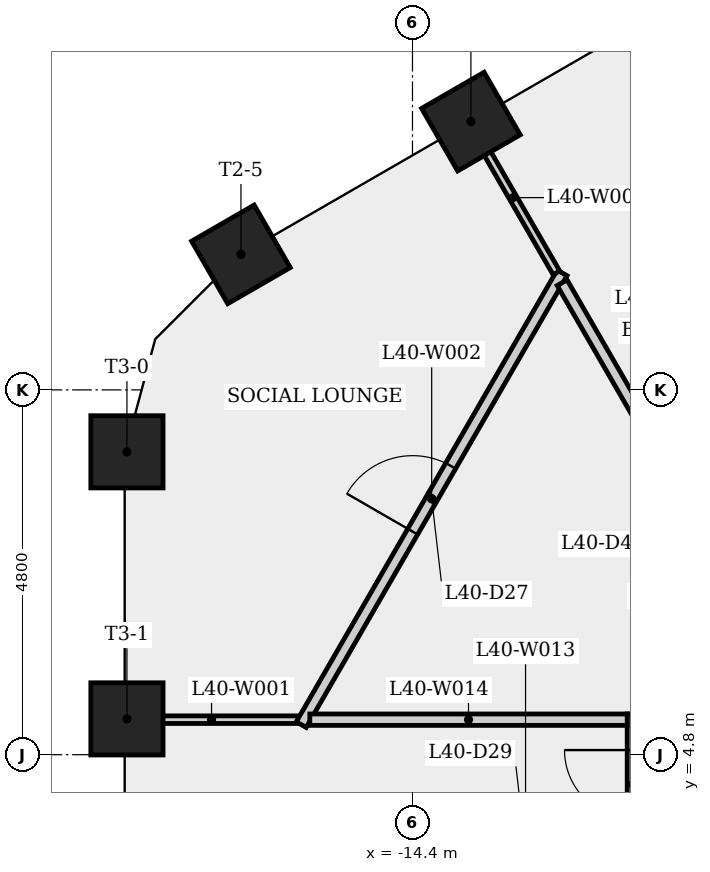
"""IFC4 building model, lengths in metres.
Left out: names, types, materials, properties, quantities, classifications, styles, units other than length and angle.
Written with IfcOpenShell. Run it as: python <this file> out.ifc"""

import sys

from ifc_helpers import new_model, si_unit, direction, frame, frame_2d, origin, origin_2d, place, context, subcontext, project, spatial, rectangle, extrude, element, fill, save


model = new_model("IFC4")
c1 = context("Model", 3, precision=1e-05, world=origin(), true_north=direction((0.0, 1.0)))
c2 = subcontext(c1, "Body", "Model", "MODEL_VIEW")
j1 = project(units=[si_unit("LENGTHUNIT", "METRE"), si_unit("PLANEANGLEUNIT", "RADIAN")], contexts=[c1])
p1 = place(None, origin())
s1 = spatial("IfcSite", under=j1, at=p1, CompositionType="ELEMENT")
p2 = place(p1, origin())
s2 = spatial("IfcBuilding", under=s1, at=p2, CompositionType="ELEMENT")
p3 = place(p2, frame((0.0, 0.0, 152.7)))
s3 = spatial("IfcBuildingStorey", under=s2, at=p3, CompositionType="ELEMENT", Elevation=152.7)
for number, where, z_axis, x_axis in (
    (1, (-13.631, 13.13, 0.0), (0.0, 0.0, 1.0), (-0.5, 0.866, 0.0)),
    (2, (-16.657, 11.383, 0.0), (0.0, 0.0, 1.0), (-0.5, 0.866, 0.0)),
    (3, (-18.157, 8.785, 0.0), (0.0, 0.0, 1.0), (-1.0, 0.0, 0.0)),
    (4, (-18.157, 5.271, 0.0), (0.0, 0.0, 1.0), (-1.0, 0.0, 0.0)),
):
    element("IfcColumn", number, at=place(p3, frame(where, z_axis=z_axis, x_axis=x_axis)), inside=s3, PredefinedType="COLUMN", context=c2, shape_type="SweptSolid", body=[
        extrude(rectangle(XDim=0.95, YDim=0.95, at=origin_2d()), origin(), (0.0, 0.0, 1.0), 3.4),
    ])
p4 = place(p3, frame((-15.901, 5.261, 0.0), z_axis=(0.0, 0.0, 1.0), x_axis=(-1.0, 0.0, 0.0)))
e5 = element("IfcWall", 5, at=p4, inside=s3, PredefinedType="PARTITIONING", context=c2, shape_type="SweptSolid", body=[
    extrude(rectangle(XDim=2.286, YDim=0.1, at=frame_2d((1.143, 0.0))), origin(), (0.0, 0.0, 1.0), 3.05),
])
p5 = place(p3, frame((-15.863, 5.196, 0.0), z_axis=(0.0, 0.0, 1.0), x_axis=(0.499991347294, 0.866030399369, 0.0)))
e6 = element("IfcWall", 6, at=p5, inside=s3, PredefinedType="PARTITIONING", context=c2, shape_type="SweptSolid", body=[
    extrude(rectangle(XDim=6.864, YDim=0.15, at=frame_2d((3.432, 0.0))), origin(), (0.0, 0.0, 1.0), 3.05),
])
p6 = place(p5, frame((2.932, 0.0, 0.0)))
e7 = element("IfcOpeningElement", 7, at=p6, cuts=e6, PredefinedType="OPENING", context=c2, shape_type="SweptSolid", body=[
    extrude(rectangle(XDim=1.0, YDim=2.1, at=frame_2d((0.5, 1.05))), frame((0.0, 0.085, 0.0), z_axis=(0.0, -1.0, 0.0), x_axis=(1.0, 0.0, 0.0)), (0.0, 0.0, 1.0), 0.17),
])
p7 = place(p3, frame((-13.649, 13.12, 0.0), z_axis=(0.0, 0.0, 1.0), x_axis=(0.499987504325, -0.866032618045, 0.0)))
e8 = element("IfcWall", 8, at=p7, inside=s3, PredefinedType="PARTITIONING", context=c2, shape_type="SweptSolid", body=[
    extrude(rectangle(XDim=2.286, YDim=0.1, at=frame_2d((1.143, 0.0))), origin(), (0.0, 0.0, 1.0), 3.05),
])
p8 = place(p3, frame((-12.431, 11.01, 0.0), z_axis=(0.0, 0.0, 1.0), x_axis=(0.500001430823, -0.866024577697, 0.0)))
e9 = element("IfcWall", 9, at=p8, inside=s3, PredefinedType="PARTITIONING", context=c2, shape_type="SweptSolid", body=[
    extrude(rectangle(XDim=5.126, YDim=0.15, at=frame_2d((2.563, 0.0))), origin(), (0.0, 0.0, 1.0), 3.05),
])
p9 = place(p8, frame((2.075, 0.0, 0.0)))
e10 = element("IfcOpeningElement", 10, at=p9, cuts=e9, PredefinedType="OPENING", context=c2, shape_type="SweptSolid", body=[
    extrude(rectangle(XDim=0.9, YDim=2.1, at=frame_2d((0.45, 1.05))), frame((0.0, 0.085, 0.0), z_axis=(0.0, -1.0, 0.0), x_axis=(1.0, 0.0, 0.0)), (0.0, 0.0, 1.0), 0.17),
])
p10 = place(p3, frame((-11.5, -5.186, 0.0), z_axis=(0.0, 0.0, 1.0), x_axis=(0.0, 1.0, 0.0)))
e11 = element("IfcWall", 11, at=p10, inside=s3, PredefinedType="PARTITIONING", context=c2, shape_type="SweptSolid", body=[
    extrude(rectangle(XDim=10.521, YDim=0.15, at=frame_2d((5.261, 0.0))), origin(), (0.0, 0.0, 1.0), 3.05),
])
p11 = place(p10, frame((9.146, 0.0, 0.0)))
e12 = element("IfcOpeningElement", 12, at=p11, cuts=e11, PredefinedType="OPENING", context=c2, shape_type="SweptSolid", body=[
    extrude(rectangle(XDim=0.9, YDim=2.1, at=frame_2d((0.45, 1.05))), frame((0.0, 0.085, 0.0), z_axis=(0.0, -1.0, 0.0), x_axis=(1.0, 0.0, 0.0)), (0.0, 0.0, 1.0), 0.17),
])
p12 = place(p10, frame((2.955, 0.0, 0.0)))
e13 = element("IfcOpeningElement", 13, at=p12, cuts=e11, PredefinedType="OPENING", context=c2, shape_type="SweptSolid", body=[
    extrude(rectangle(XDim=1.0, YDim=2.1, at=frame_2d((0.5, 1.05))), frame((0.0, 0.085, 0.0), z_axis=(0.0, -1.0, 0.0), x_axis=(1.0, 0.0, 0.0)), (0.0, 0.0, 1.0), 0.17),
])
p13 = place(p3, frame((-11.575, 5.261, 0.0), z_axis=(0.0, 0.0, 1.0), x_axis=(-1.0, 0.0, 0.0)))
e14 = element("IfcWall", 14, at=p13, inside=s3, PredefinedType="PARTITIONING", context=c2, shape_type="SweptSolid", body=[
    extrude(rectangle(XDim=4.176, YDim=0.15, at=frame_2d((2.088, 0.0))), origin(), (0.0, 0.0, 1.0), 3.05),
])
p14 = place(p6, origin())
e15 = element("IfcDoor", 15, at=p14, inside=s3, OperationType="SINGLE_SWING_LEFT", PredefinedType="DOOR", context=c2, shape_type="SweptSolid", body=[
    extrude(rectangle(XDim=1.0, YDim=2.1, at=frame_2d((0.5, 1.05))), frame((0.0, 0.025, 0.0), z_axis=(0.0, -1.0, 0.0), x_axis=(1.0, 0.0, 0.0)), (0.0, 0.0, 1.0), 0.05),
])
fill(e7, e15)
save(model, sys.argv[1])
